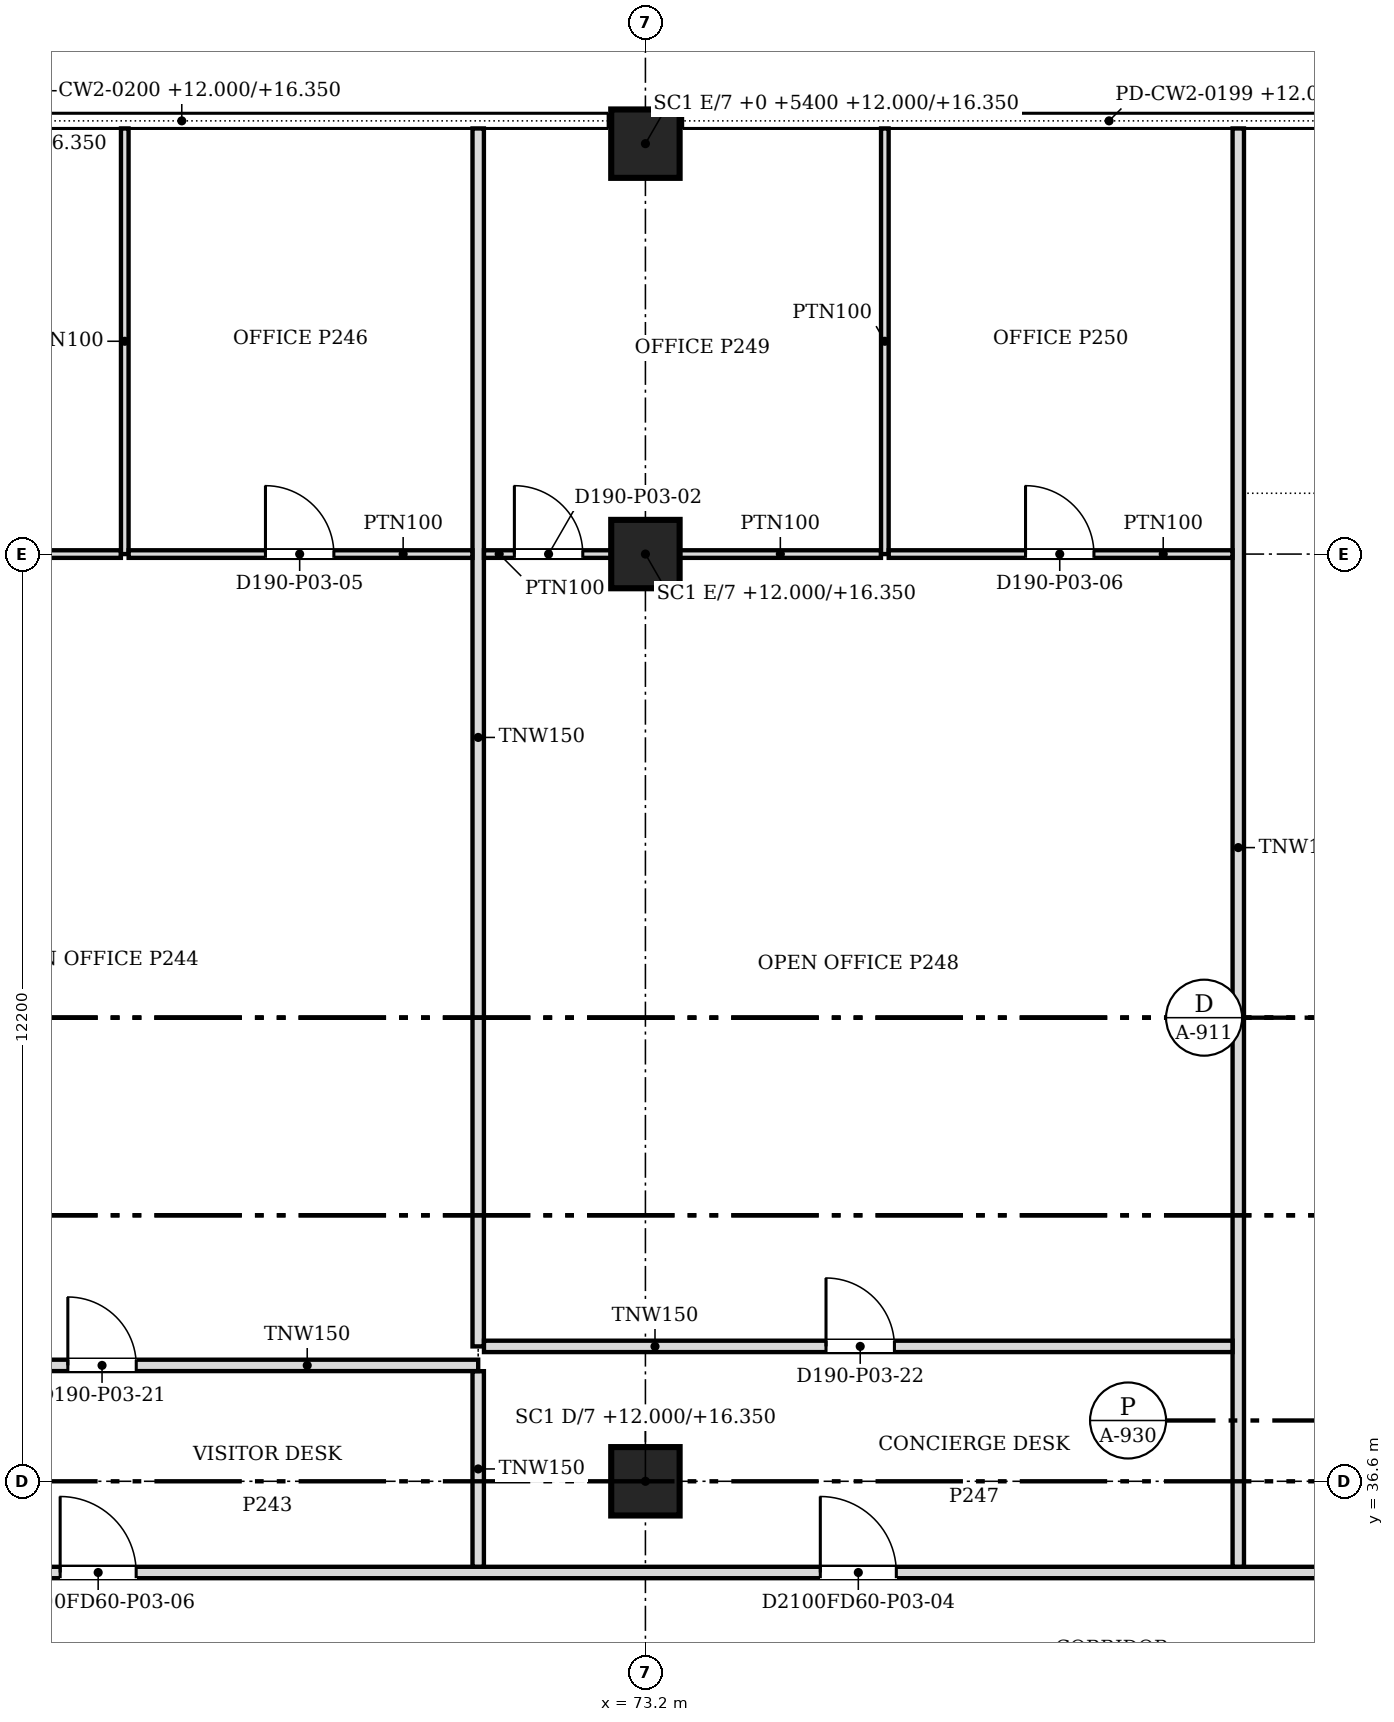
"""IFC4 building model, lengths in metres.
Left out: names, types, materials, properties, quantities, classifications, styles, units other than length and angle.
Written with IfcOpenShell. Run it as: python <this file> out.ifc"""

import sys

from ifc_helpers import new_model, si_unit, direction, frame, frame_2d, origin, origin_2d, place, context, subcontext, project, spatial, rectangle, extrude, source, transform, mapped, element, fill, save


model = new_model("IFC4")
c1 = context("Model", 3, precision=1e-05, world=origin(), true_north=direction((0.0, 1.0)))
c2 = subcontext(c1, "Body", "Model", "MODEL_VIEW")
j1 = project(units=[si_unit("LENGTHUNIT", "METRE"), si_unit("PLANEANGLEUNIT", "RADIAN")], contexts=[c1])
p1 = place(None, origin())
s1 = spatial("IfcSite", under=j1, at=p1, CompositionType="ELEMENT")
p2 = place(p1, origin())
s2 = spatial("IfcBuilding", under=s1, at=p2, CompositionType="ELEMENT")
p3 = place(p2, frame((0.0, 0.0, 12.0)))
s3 = spatial("IfcBuildingStorey", under=s2, at=p3, CompositionType="ELEMENT", Elevation=12.0)
for number, where, z_axis, x_axis in (
    (1, (73.2, 36.6, 0.0), (0.0, 0.0, 1.0), (1.0, 0.0, 0.0)),
    (2, (73.2, 48.8, 0.0), (0.0, 0.0, 1.0), (1.0, 0.0, 0.0)),
    (3, (73.2, 54.2, 0.0), (0.0, 0.0, 1.0), (1.0, 0.0, 0.0)),
):
    element("IfcColumn", number, at=place(p3, frame(where, z_axis=z_axis, x_axis=x_axis)), inside=s3, PredefinedType="COLUMN", context=c2, shape_type="SweptSolid", body=[
        extrude(rectangle(XDim=0.9, YDim=0.9, at=origin_2d()), origin(), (0.0, 0.0, 1.0), 4.35),
    ])
p4 = place(p3, frame((61.0, 35.4, 0.0), z_axis=(0.0, 0.0, 1.0), x_axis=(1.0, 0.0, 0.0)))
e4 = element("IfcWall", 4, at=p4, inside=s3, PredefinedType="PARTITIONING", context=c2, shape_type="SweptSolid", body=[
    extrude(rectangle(XDim=34.124, YDim=0.15, at=frame_2d((17.062, 0.0))), origin(), (0.0, 0.0, 1.0), 3.672),
])
m1 = source(origin(), c2, "Body", "SweptSolid", [
    extrude(rectangle(XDim=1.0, YDim=2.1, at=frame_2d((0.5, 1.05))), frame((0.0, 0.085, 0.0), z_axis=(0.0, -1.0, 0.0), x_axis=(1.0, 0.0, 0.0)), (0.0, 0.0, 1.0), 0.17),
])
p5 = place(p4, frame((14.501, 0.0, 0.0)))
e5 = element("IfcOpeningElement", 5, at=p5, cuts=e4, PredefinedType="OPENING", context=c2, shape_type="MappedRepresentation", body=[
    mapped(m1, transform((0.0, 0.0, 0.0), scale=1.0)),
])
p6 = place(p4, frame((4.5, 0.0, 0.0)))
e6 = element("IfcOpeningElement", 6, at=p6, cuts=e4, PredefinedType="OPENING", context=c2, shape_type="MappedRepresentation", body=[
    mapped(m1, transform((0.0, 0.0, 0.0), scale=1.0)),
])
m2 = source(origin(), c2, "Body", "SweptSolid", [
    extrude(rectangle(XDim=0.9, YDim=2.1, at=frame_2d((0.45, 1.05))), frame((0.0, 0.085, 0.0), z_axis=(0.0, -1.0, 0.0), x_axis=(1.0, 0.0, 0.0)), (0.0, 0.0, 1.0), 0.17),
])
p7 = place(p4, frame((25.1, 0.0, 0.0)))
e7 = element("IfcOpeningElement", 7, at=p7, cuts=e4, PredefinedType="OPENING", context=c2, shape_type="MappedRepresentation", body=[
    mapped(m2, transform((0.0, 0.0, 0.0), scale=1.0)),
])
p8 = place(p3, frame((71.0, 35.476, 0.0), z_axis=(0.0, 0.0, 1.0), x_axis=(0.0, 1.0, 0.0)))
e8 = element("IfcWall", 8, at=p8, inside=s3, PredefinedType="PARTITIONING", context=c2, shape_type="SweptSolid", body=[
    extrude(rectangle(XDim=2.573, YDim=0.15, at=frame_2d((1.287, 0.0))), origin(), (0.0, 0.0, 1.0), 3.672),
])
p9 = place(p3, frame((81.0, 35.476, 0.0), z_axis=(0.0, 0.0, 1.0), x_axis=(0.0, 1.0, 0.0)))
e9 = element("IfcWall", 9, at=p9, inside=s3, PredefinedType="PARTITIONING", context=c2, shape_type="SweptSolid", body=[
    extrude(rectangle(XDim=18.924, YDim=0.15, at=frame_2d((9.462, 0.0))), origin(), (0.0, 0.0, 1.0), 3.672),
])
p10 = place(p3, frame((61.201, 38.125, 0.0), z_axis=(0.0, 0.0, 1.0), x_axis=(1.0, 0.0, 0.0)))
e10 = element("IfcWall", 10, at=p10, inside=s3, PredefinedType="PARTITIONING", context=c2, shape_type="SweptSolid", body=[
    extrude(rectangle(XDim=9.799, YDim=0.15, at=frame_2d((4.899, 0.0))), origin(), (0.0, 0.0, 1.0), 3.672),
])
p11 = place(p10, frame((4.4, 0.0, 0.0)))
e11 = element("IfcOpeningElement", 11, at=p11, cuts=e10, PredefinedType="OPENING", context=c2, shape_type="MappedRepresentation", body=[
    mapped(m2, transform((0.0, 0.0, 0.0), scale=1.0)),
])
p12 = place(p3, frame((71.0, 38.375, 0.0), z_axis=(0.0, 0.0, 1.0), x_axis=(0.0, 1.0, 0.0)))
e12 = element("IfcWall", 12, at=p12, inside=s3, PredefinedType="PARTITIONING", context=c2, shape_type="SweptSolid", body=[
    extrude(rectangle(XDim=16.025, YDim=0.15, at=frame_2d((8.012, 0.0))), origin(), (0.0, 0.0, 1.0), 3.672),
])
p13 = place(p3, frame((71.076, 38.375, 0.0), z_axis=(0.0, 0.0, 1.0), x_axis=(1.0, 0.0, 0.0)))
e13 = element("IfcWall", 13, at=p13, inside=s3, PredefinedType="PARTITIONING", context=c2, shape_type="SweptSolid", body=[
    extrude(rectangle(XDim=9.848, YDim=0.15, at=frame_2d((4.924, 0.0))), origin(), (0.0, 0.0, 1.0), 3.672),
])
p14 = place(p13, frame((4.5, 0.0, 0.0)))
e14 = element("IfcOpeningElement", 14, at=p14, cuts=e13, PredefinedType="OPENING", context=c2, shape_type="MappedRepresentation", body=[
    mapped(m2, transform((0.0, 0.0, 0.0), scale=1.0)),
])
p15 = place(p3, frame((61.201, 48.8, 0.0), z_axis=(0.0, 0.0, 1.0), x_axis=(1.0, 0.0, 0.0)))
e15 = element("IfcWall", 15, at=p15, inside=s3, PredefinedType="PARTITIONING", context=c2, shape_type="SweptSolid", body=[
    extrude(rectangle(XDim=5.098, YDim=0.1, at=frame_2d((2.549, 0.0))), origin(), (0.0, 0.0, 1.0), 3.672),
])
m3 = source(origin(), c2, "Body", "SweptSolid", [
    extrude(rectangle(XDim=0.9, YDim=2.1, at=frame_2d((0.45, 1.05))), frame((0.0, 0.06, 0.0), z_axis=(0.0, -1.0, 0.0), x_axis=(1.0, 0.0, 0.0)), (0.0, 0.0, 1.0), 0.12),
])
p16 = place(p15, frame((2.1, 0.0, 0.0)))
e16 = element("IfcOpeningElement", 16, at=p16, cuts=e15, PredefinedType="OPENING", context=c2, shape_type="MappedRepresentation", body=[
    mapped(m3, transform((0.0, 0.0, 0.0), scale=1.0)),
])
p17 = place(p3, frame((66.35, 48.8, 0.0), z_axis=(0.0, 0.0, 1.0), x_axis=(0.0, 1.0, 0.0)))
e17 = element("IfcWall", 17, at=p17, inside=s3, PredefinedType="PARTITIONING", context=c2, shape_type="SweptSolid", body=[
    extrude(rectangle(XDim=5.6, YDim=0.1, at=frame_2d((2.8, 0.0))), origin(), (0.0, 0.0, 1.0), 3.672),
])
p18 = place(p3, frame((66.401, 48.8, 0.0), z_axis=(0.0, 0.0, 1.0), x_axis=(1.0, 0.0, 0.0)))
e18 = element("IfcWall", 18, at=p18, inside=s3, PredefinedType="PARTITIONING", context=c2, shape_type="SweptSolid", body=[
    extrude(rectangle(XDim=4.523, YDim=0.1, at=frame_2d((2.262, 0.0))), origin(), (0.0, 0.0, 1.0), 3.672),
])
p19 = place(p18, frame((1.8, 0.0, 0.0)))
e19 = element("IfcOpeningElement", 19, at=p19, cuts=e18, PredefinedType="OPENING", context=c2, shape_type="MappedRepresentation", body=[
    mapped(m3, transform((0.0, 0.0, 0.0), scale=1.0)),
])
p20 = place(p3, frame((71.076, 48.8, 0.0), z_axis=(0.0, 0.0, 1.0), x_axis=(1.0, 0.0, 0.0)))
e20 = element("IfcWall", 20, at=p20, inside=s3, PredefinedType="PARTITIONING", context=c2, shape_type="SweptSolid", body=[
    extrude(rectangle(XDim=1.673, YDim=0.1, at=frame_2d((0.836, 0.0))), origin(), (0.0, 0.0, 1.0), 3.672),
])
p21 = place(p20, frame((0.4, 0.0, 0.0)))
e21 = element("IfcOpeningElement", 21, at=p21, cuts=e20, PredefinedType="OPENING", context=c2, shape_type="MappedRepresentation", body=[
    mapped(m3, transform((0.0, 0.0, 0.0), scale=1.0)),
])
p22 = place(p3, frame((73.651, 48.8, 0.0), z_axis=(0.0, 0.0, 1.0), x_axis=(1.0, 0.0, 0.0)))
e22 = element("IfcWall", 22, at=p22, inside=s3, PredefinedType="PARTITIONING", context=c2, shape_type="SweptSolid", body=[
    extrude(rectangle(XDim=2.648, YDim=0.1, at=frame_2d((1.324, 0.0))), origin(), (0.0, 0.0, 1.0), 3.672),
])
p23 = place(p3, frame((76.35, 48.8, 0.0), z_axis=(0.0, 0.0, 1.0), x_axis=(0.0, 1.0, 0.0)))
e23 = element("IfcWall", 23, at=p23, inside=s3, PredefinedType="PARTITIONING", context=c2, shape_type="SweptSolid", body=[
    extrude(rectangle(XDim=5.6, YDim=0.1, at=frame_2d((2.8, 0.0))), origin(), (0.0, 0.0, 1.0), 3.672),
])
p24 = place(p3, frame((76.401, 48.8, 0.0), z_axis=(0.0, 0.0, 1.0), x_axis=(1.0, 0.0, 0.0)))
e24 = element("IfcWall", 24, at=p24, inside=s3, PredefinedType="PARTITIONING", context=c2, shape_type="SweptSolid", body=[
    extrude(rectangle(XDim=4.523, YDim=0.1, at=frame_2d((2.262, 0.0))), origin(), (0.0, 0.0, 1.0), 3.672),
])
p25 = place(p24, frame((1.8, 0.0, 0.0)))
e25 = element("IfcOpeningElement", 25, at=p25, cuts=e24, PredefinedType="OPENING", context=c2, shape_type="MappedRepresentation", body=[
    mapped(m3, transform((0.0, 0.0, 0.0), scale=1.0)),
])
p26 = place(p3, frame((81.076, 49.55, 0.0), z_axis=(0.0, 0.0, 1.0), x_axis=(1.0, 0.0, 0.0)))
e26 = element("IfcWall", 26, at=p26, inside=s3, PredefinedType="PARTITIONING", context=c2, shape_type="SweptSolid", body=[
    extrude(rectangle(XDim=10.348, YDim=0.1, at=frame_2d((5.174, 0.0))), origin(), (0.0, 0.0, 1.0), 3.672),
])
p27 = place(p26, frame((2.0, 0.0, 0.0)))
e27 = element("IfcOpeningElement", 27, at=p27, cuts=e26, PredefinedType="OPENING", context=c2, shape_type="MappedRepresentation", body=[
    mapped(m3, transform((0.0, 0.0, 0.0), scale=1.0)),
])
p28 = place(p26, frame((7.197, 0.0, 0.0)))
e28 = element("IfcOpeningElement", 28, at=p28, cuts=e26, PredefinedType="OPENING", context=c2, shape_type="MappedRepresentation", body=[
    mapped(m3, transform((0.0, 0.0, 0.0), scale=1.0)),
])
m4 = source(origin(), c2, "Body", "SweptSolid", [
    extrude(rectangle(XDim=0.9, YDim=2.1, at=frame_2d((0.45, 1.05))), frame((0.0, 0.025, 0.0), z_axis=(0.0, -1.0, 0.0), x_axis=(1.0, 0.0, 0.0)), (0.0, 0.0, 1.0), 0.05),
])
p29 = place(p21, origin())
e29 = element("IfcDoor", 29, at=p29, inside=s3, OperationType="SINGLE_SWING_LEFT", PredefinedType="DOOR", context=c2, shape_type="MappedRepresentation", body=[
    mapped(m4, transform((0.0, 0.0, 0.0), scale=1.0)),
])
fill(e21, e29)
p30 = place(p19, origin())
e30 = element("IfcDoor", 30, at=p30, inside=s3, OperationType="SINGLE_SWING_LEFT", PredefinedType="DOOR", context=c2, shape_type="MappedRepresentation", body=[
    mapped(m4, transform((0.0, 0.0, 0.0), scale=1.0)),
])
fill(e19, e30)
p31 = place(p25, origin())
e31 = element("IfcDoor", 31, at=p31, inside=s3, OperationType="SINGLE_SWING_LEFT", PredefinedType="DOOR", context=c2, shape_type="MappedRepresentation", body=[
    mapped(m4, transform((0.0, 0.0, 0.0), scale=1.0)),
])
fill(e25, e31)
p32 = place(p11, origin())
e32 = element("IfcDoor", 32, at=p32, inside=s3, OperationType="SINGLE_SWING_LEFT", PredefinedType="DOOR", context=c2, shape_type="MappedRepresentation", body=[
    mapped(m4, transform((0.0, 0.0, 0.0), scale=1.0)),
])
fill(e11, e32)
p33 = place(p14, origin())
e33 = element("IfcDoor", 33, at=p33, inside=s3, OperationType="SINGLE_SWING_LEFT", PredefinedType="DOOR", context=c2, shape_type="MappedRepresentation", body=[
    mapped(m4, transform((0.0, 0.0, 0.0), scale=1.0)),
])
fill(e14, e33)
m5 = source(origin(), c2, "Body", "SweptSolid", [
    extrude(rectangle(XDim=1.0, YDim=2.1, at=frame_2d((0.5, 1.05))), frame((0.0, 0.025, 0.0), z_axis=(0.0, -1.0, 0.0), x_axis=(1.0, 0.0, 0.0)), (0.0, 0.0, 1.0), 0.05),
])
p34 = place(p5, origin())
e34 = element("IfcDoor", 34, at=p34, inside=s3, OperationType="SINGLE_SWING_LEFT", PredefinedType="DOOR", context=c2, shape_type="MappedRepresentation", body=[
    mapped(m5, transform((0.0, 0.0, 0.0), scale=1.0)),
])
fill(e5, e34)
p35 = place(p6, origin())
e35 = element("IfcDoor", 35, at=p35, inside=s3, OperationType="SINGLE_SWING_LEFT", PredefinedType="DOOR", context=c2, shape_type="MappedRepresentation", body=[
    mapped(m5, transform((0.0, 0.0, 0.0), scale=1.0)),
])
fill(e6, e35)
save(model, sys.argv[1])
